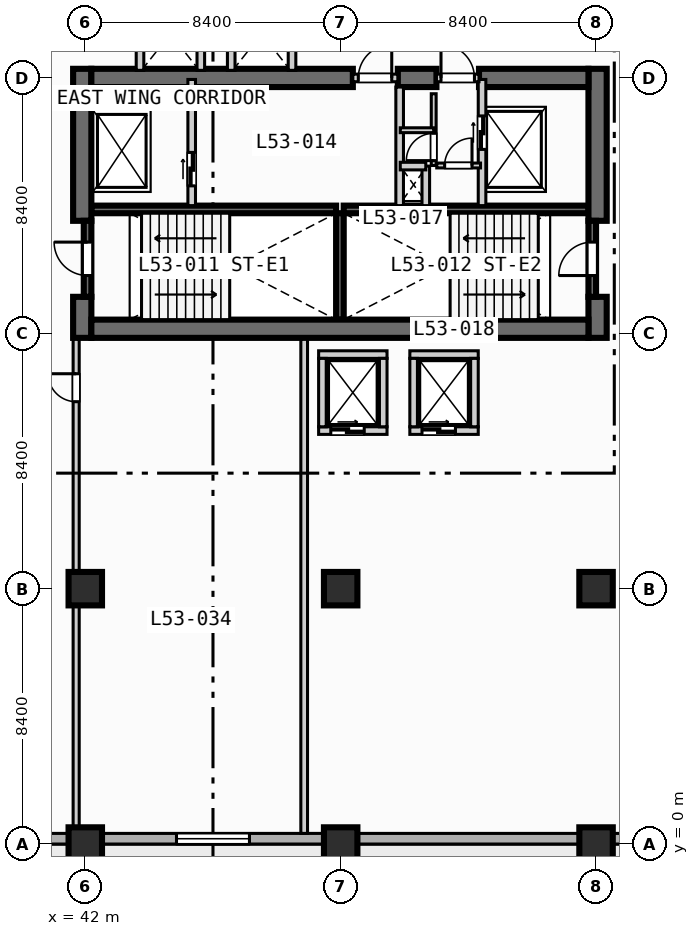
"""IFC4 building model, lengths in metres.
Left out: names, types, materials, properties, quantities, classifications, styles, units other than length and angle.
Written with IfcOpenShell. Run it as: python <this file> out.ifc"""

import sys

from ifc_helpers import new_model, si_unit, direction, frame, frame_2d, origin, origin_2d, place, context, subcontext, project, spatial, rectangle, extrude, element, fill, save


model = new_model("IFC4")
c1 = context("Model", 3, precision=1e-05, world=origin(), true_north=direction((0.0, 1.0)))
c2 = subcontext(c1, "Body", "Model", "MODEL_VIEW")
j1 = project(units=[si_unit("LENGTHUNIT", "METRE"), si_unit("PLANEANGLEUNIT", "RADIAN")], contexts=[c1])
p1 = place(None, origin())
s1 = spatial("IfcSite", under=j1, at=p1, CompositionType="ELEMENT")
p2 = place(p1, origin())
s2 = spatial("IfcBuilding", under=s1, at=p2, CompositionType="ELEMENT")
p3 = place(p2, frame((0.0, 0.0, 216.1)))
s3 = spatial("IfcBuildingStorey", under=s2, at=p3, CompositionType="ELEMENT", Elevation=216.1)
for number, where, z_axis, x_axis in (
    (1, (42.2, 20.875, 0.0), (0.0, 0.0, 1.0), (1.0, 0.0, 0.0)),
    (2, (50.5, 20.875, 0.0), (0.0, 0.0, 1.0), (1.0, 0.0, 0.0)),
):
    element("IfcWall", number, at=place(p3, frame(where, z_axis=z_axis, x_axis=x_axis)), inside=s3, PredefinedType="SOLIDWALL", context=c2, shape_type="SweptSolid", body=[
        extrude(rectangle(XDim=8.05, YDim=0.25, at=frame_2d((4.025, 0.0))), origin(), (0.0, 0.0, 1.0), 3.47),
    ])
p4 = place(p3, frame((50.375, 17.25, 0.0), z_axis=(0.0, 0.0, 1.0), x_axis=(0.0, 1.0, 0.0)))
e3 = element("IfcWall", 3, at=p4, inside=s3, PredefinedType="SOLIDWALL", context=c2, shape_type="SweptSolid", body=[
    extrude(rectangle(XDim=3.5, YDim=0.25, at=frame_2d((1.75, 0.0))), origin(), (0.0, 0.0, 1.0), 3.47),
])
p5 = place(p3, frame((41.9, 16.65, 0.0), z_axis=(0.0, 0.0, 1.0), x_axis=(0.0, 1.0, 0.0)))
e4 = element("IfcWall", 4, at=p5, inside=s3, PredefinedType="SHEAR", context=c2, shape_type="SweptSolid", body=[
    extrude(rectangle(XDim=1.35, YDim=0.6, at=frame_2d((0.675, 0.0))), origin(), (0.0, 0.0, 1.0), 3.47),
])
p6 = place(p3, frame((41.9, 20.5, 0.0), z_axis=(0.0, 0.0, 1.0), x_axis=(0.0, 1.0, 0.0)))
e5 = element("IfcWall", 5, at=p6, inside=s3, PredefinedType="SHEAR", context=c2, shape_type="SweptSolid", body=[
    extrude(rectangle(XDim=5.0, YDim=0.6, at=frame_2d((2.5, 0.0))), origin(), (0.0, 0.0, 1.0), 3.47),
])
p7 = place(p3, frame((58.85, 16.65, 0.0), z_axis=(0.0, 0.0, 1.0), x_axis=(0.0, 1.0, 0.0)))
e6 = element("IfcWall", 6, at=p7, inside=s3, PredefinedType="SHEAR", context=c2, shape_type="SweptSolid", body=[
    extrude(rectangle(XDim=1.35, YDim=0.6, at=frame_2d((0.675, 0.0))), origin(), (0.0, 0.0, 1.0), 3.47),
])
p8 = place(p3, frame((58.85, 20.5, 0.0), z_axis=(0.0, 0.0, 1.0), x_axis=(0.0, 1.0, 0.0)))
e7 = element("IfcWall", 7, at=p8, inside=s3, PredefinedType="SHEAR", context=c2, shape_type="SweptSolid", body=[
    extrude(rectangle(XDim=5.0, YDim=0.6, at=frame_2d((2.5, 0.0))), origin(), (0.0, 0.0, 1.0), 3.47),
])
p9 = place(p3, frame((42.2, 16.95, 0.0), z_axis=(0.0, 0.0, 1.0), x_axis=(1.0, 0.0, 0.0)))
e8 = element("IfcWall", 8, at=p9, inside=s3, PredefinedType="SHEAR", context=c2, shape_type="SweptSolid", body=[
    extrude(rectangle(XDim=16.35, YDim=0.6, at=frame_2d((8.175, 0.0))), origin(), (0.0, 0.0, 1.0), 3.47),
])
p10 = place(p3, frame((42.2, 25.2, 0.0), z_axis=(0.0, 0.0, 1.0), x_axis=(1.0, 0.0, 0.0)))
e9 = element("IfcWall", 9, at=p10, inside=s3, PredefinedType="SHEAR", context=c2, shape_type="SweptSolid", body=[
    extrude(rectangle(XDim=8.6, YDim=0.6, at=frame_2d((4.3, 0.0))), origin(), (0.0, 0.0, 1.0), 3.47),
])
p11 = place(p3, frame((52.28, 25.2, 0.0), z_axis=(0.0, 0.0, 1.0), x_axis=(1.0, 0.0, 0.0)))
e10 = element("IfcWall", 10, at=p11, inside=s3, PredefinedType="SHEAR", context=c2, shape_type="SweptSolid", body=[
    extrude(rectangle(XDim=1.27, YDim=0.6, at=frame_2d((0.635, 0.0))), origin(), (0.0, 0.0, 1.0), 3.47),
])
p12 = place(p3, frame((54.95, 25.2, 0.0), z_axis=(0.0, 0.0, 1.0), x_axis=(1.0, 0.0, 0.0)))
e11 = element("IfcWall", 11, at=p12, inside=s3, PredefinedType="SHEAR", context=c2, shape_type="SweptSolid", body=[
    extrude(rectangle(XDim=3.6, YDim=0.6, at=frame_2d((1.8, 0.0))), origin(), (0.0, 0.0, 1.0), 3.47),
])
for number, where, z_axis, x_axis in (
    (12, (42.0, 0.0, 0.0), (0.0, 0.0, 1.0), (1.0, 0.0, 0.0)),
    (13, (42.0, 8.4, 0.0), (0.0, 0.0, 1.0), (1.0, 0.0, 0.0)),
    (14, (50.4, 0.0, 0.0), (0.0, 0.0, 1.0), (1.0, 0.0, 0.0)),
    (15, (50.4, 8.4, 0.0), (0.0, 0.0, 1.0), (1.0, 0.0, 0.0)),
    (16, (58.8, 0.0, 0.0), (0.0, 0.0, 1.0), (1.0, 0.0, 0.0)),
    (17, (58.8, 8.4, 0.0), (0.0, 0.0, 1.0), (1.0, 0.0, 0.0)),
):
    element("IfcColumn", number, at=place(p3, frame(where, z_axis=z_axis, x_axis=x_axis)), inside=s3, PredefinedType="COLUMN", context=c2, shape_type="SweptSolid", body=[
        extrude(rectangle(XDim=1.1, YDim=1.1, at=origin_2d()), origin(), (0.0, 0.0, 1.0), 3.7),
    ])
p13 = place(p3, frame((72.425, 0.175, 0.0), z_axis=(0.0, 0.0, 1.0), x_axis=(-1.0, 0.0, 0.0)))
e18 = element("IfcWall", 18, at=p13, inside=s3, PredefinedType="STANDARD", context=c2, shape_type="SweptSolid", body=[
    extrude(rectangle(XDim=69.25, YDim=0.35, at=frame_2d((34.625, 0.0))), origin(), (0.0, 0.0, 1.0), 3.47),
])
p14 = place(p13, frame((50.725, 0.0, 0.0)))
e19 = element("IfcOpeningElement", 19, at=p14, cuts=e18, PredefinedType="OPENING", context=c2, shape_type="SweptSolid", body=[
    extrude(rectangle(XDim=1.4, YDim=2.2, at=frame_2d((0.7, 1.1))), frame((0.0, 0.185, 0.0), z_axis=(0.0, -1.0, 0.0), x_axis=(1.0, 0.0, 0.0)), (0.0, 0.0, 1.0), 0.37),
])
p15 = place(p13, frame((58.625, 0.0, 0.85)))
e20 = element("IfcOpeningElement", 20, at=p15, cuts=e18, PredefinedType="OPENING", context=c2, shape_type="SweptSolid", body=[
    extrude(rectangle(XDim=2.4, YDim=1.95, at=frame_2d((1.2, 0.975))), frame((0.0, 0.185, 0.0), z_axis=(0.0, -1.0, 0.0), x_axis=(1.0, 0.0, 0.0)), (0.0, 0.0, 1.0), 0.37),
])
p16 = place(p13, frame((33.725, 0.0, 0.85)))
e21 = element("IfcOpeningElement", 21, at=p16, cuts=e18, PredefinedType="OPENING", context=c2, shape_type="SweptSolid", body=[
    extrude(rectangle(XDim=1.8, YDim=1.8, at=frame_2d((0.9, 0.9))), frame((0.0, 0.185, 0.0), z_axis=(0.0, -1.0, 0.0), x_axis=(1.0, 0.0, 0.0)), (0.0, 0.0, 1.0), 0.37),
])
p17 = place(p13, frame((25.025, 0.0, 0.85)))
e22 = element("IfcOpeningElement", 22, at=p17, cuts=e18, PredefinedType="OPENING", context=c2, shape_type="SweptSolid", body=[
    extrude(rectangle(XDim=2.4, YDim=1.95, at=frame_2d((1.2, 0.975))), frame((0.0, 0.185, 0.0), z_axis=(0.0, -1.0, 0.0), x_axis=(1.0, 0.0, 0.0)), (0.0, 0.0, 1.0), 0.37),
])
p18 = place(p13, frame((9.075, 0.0, 0.85)))
e23 = element("IfcOpeningElement", 23, at=p18, cuts=e18, PredefinedType="OPENING", context=c2, shape_type="SweptSolid", body=[
    extrude(rectangle(XDim=1.8, YDim=1.8, at=frame_2d((0.9, 0.9))), frame((0.0, 0.185, 0.0), z_axis=(0.0, -1.0, 0.0), x_axis=(1.0, 0.0, 0.0)), (0.0, 0.0, 1.0), 0.37),
])
p19 = place(p13, frame((2.675, 0.0, 0.85)))
e24 = element("IfcOpeningElement", 24, at=p19, cuts=e18, PredefinedType="OPENING", context=c2, shape_type="SweptSolid", body=[
    extrude(rectangle(XDim=1.8, YDim=1.8, at=frame_2d((0.9, 0.9))), frame((0.0, 0.185, 0.0), z_axis=(0.0, -1.0, 0.0), x_axis=(1.0, 0.0, 0.0)), (0.0, 0.0, 1.0), 0.37),
])
p20 = place(p3, frame((42.075, 18.0, 0.0), z_axis=(0.0, 0.0, 1.0), x_axis=(0.0, 1.0, 0.0)))
e25 = element("IfcWall", 25, at=p20, inside=s3, PredefinedType="SOLIDWALL", context=c2, shape_type="SweptSolid", body=[
    extrude(rectangle(XDim=2.5, YDim=0.25, at=frame_2d((1.25, 0.0))), origin(), (0.0, 0.0, 1.0), 3.47),
])
p21 = place(p20, frame((0.7, 0.0, 0.0)))
e26 = element("IfcOpeningElement", 26, at=p21, cuts=e25, PredefinedType="OPENING", context=c2, shape_type="SweptSolid", body=[
    extrude(rectangle(XDim=1.1, YDim=2.15, at=frame_2d((0.55, 1.075))), frame((0.0, 0.135, 0.0), z_axis=(0.0, -1.0, 0.0), x_axis=(1.0, 0.0, 0.0)), (0.0, 0.0, 1.0), 0.27),
])
p22 = place(p3, frame((58.675, 18.0, 0.0), z_axis=(0.0, 0.0, 1.0), x_axis=(0.0, 1.0, 0.0)))
e27 = element("IfcWall", 27, at=p22, inside=s3, PredefinedType="SOLIDWALL", context=c2, shape_type="SweptSolid", body=[
    extrude(rectangle(XDim=2.5, YDim=0.25, at=frame_2d((1.25, 0.0))), origin(), (0.0, 0.0, 1.0), 3.47),
])
p23 = place(p22, frame((0.7, 0.0, 0.0)))
e28 = element("IfcOpeningElement", 28, at=p23, cuts=e27, PredefinedType="OPENING", context=c2, shape_type="SweptSolid", body=[
    extrude(rectangle(XDim=1.1, YDim=2.15, at=frame_2d((0.55, 1.075))), frame((0.0, 0.135, 0.0), z_axis=(0.0, -1.0, 0.0), x_axis=(1.0, 0.0, 0.0)), (0.0, 0.0, 1.0), 0.27),
])
p24 = place(p3, frame((45.5, 21.0, 0.0), z_axis=(0.0, 0.0, 1.0), x_axis=(0.0, 1.0, 0.0)))
e29 = element("IfcWall", 29, at=p24, inside=s3, PredefinedType="SOLIDWALL", context=c2, shape_type="SweptSolid", body=[
    extrude(rectangle(XDim=4.15, YDim=0.25, at=frame_2d((2.075, 0.0))), origin(), (0.0, 0.0, 1.0), 3.47),
])
p25 = place(p24, frame((0.65, 0.0, 0.0)))
e30 = element("IfcOpeningElement", 30, at=p25, cuts=e29, PredefinedType="OPENING", context=c2, shape_type="SweptSolid", body=[
    extrude(rectangle(XDim=1.1, YDim=2.15, at=frame_2d((0.55, 1.075))), frame((0.0, 0.135, 0.0), z_axis=(0.0, -1.0, 0.0), x_axis=(1.0, 0.0, 0.0)), (0.0, 0.0, 1.0), 0.27),
])
p26 = place(p3, frame((50.8, 25.2, 0.0), z_axis=(0.0, 0.0, 1.0), x_axis=(1.0, 0.0, 0.0)))
e31 = element("IfcWall", 31, at=p26, inside=s3, PredefinedType="SOLIDWALL", context=c2, shape_type="SweptSolid", body=[
    extrude(rectangle(XDim=1.48, YDim=0.25, at=frame_2d((0.74, 0.0))), origin(), (0.0, 0.0, 1.0), 3.47),
])
p27 = place(p26, frame((0.18, 0.0, 0.0)))
e32 = element("IfcOpeningElement", 32, at=p27, cuts=e31, PredefinedType="OPENING", context=c2, shape_type="SweptSolid", body=[
    extrude(rectangle(XDim=1.1, YDim=2.15, at=frame_2d((0.55, 1.075))), frame((0.0, 0.135, 0.0), z_axis=(0.0, -1.0, 0.0), x_axis=(1.0, 0.0, 0.0)), (0.0, 0.0, 1.0), 0.27),
])
p28 = place(p3, frame((52.34, 21.0, 0.0), z_axis=(0.0, 0.0, 1.0), x_axis=(0.0, 1.0, 0.0)))
e33 = element("IfcWall", 33, at=p28, inside=s3, PredefinedType="SOLIDWALL", context=c2, shape_type="SweptSolid", body=[
    extrude(rectangle(XDim=3.9, YDim=0.25, at=frame_2d((1.95, 0.0))), origin(), (0.0, 0.0, 1.0), 3.47),
])
p29 = place(p3, frame((55.05, 21.0, 0.0), z_axis=(0.0, 0.0, 1.0), x_axis=(0.0, 1.0, 0.0)))
e34 = element("IfcWall", 34, at=p29, inside=s3, PredefinedType="SOLIDWALL", context=c2, shape_type="SweptSolid", body=[
    extrude(rectangle(XDim=4.15, YDim=0.25, at=frame_2d((2.075, 0.0))), origin(), (0.0, 0.0, 1.0), 3.47),
])
p30 = place(p29, frame((1.85, 0.0, 0.0)))
e35 = element("IfcOpeningElement", 35, at=p30, cuts=e34, PredefinedType="OPENING", context=c2, shape_type="SweptSolid", body=[
    extrude(rectangle(XDim=1.1, YDim=2.15, at=frame_2d((0.55, 1.075))), frame((0.0, 0.135, 0.0), z_axis=(0.0, -1.0, 0.0), x_axis=(1.0, 0.0, 0.0)), (0.0, 0.0, 1.0), 0.27),
])
p31 = place(p3, frame((53.55, 25.2, 0.0), z_axis=(0.0, 0.0, 1.0), x_axis=(1.0, 0.0, 0.0)))
e36 = element("IfcWall", 36, at=p31, inside=s3, PredefinedType="SOLIDWALL", context=c2, shape_type="SweptSolid", body=[
    extrude(rectangle(XDim=1.4, YDim=0.25, at=frame_2d((0.7, 0.0))), origin(), (0.0, 0.0, 1.0), 3.47),
])
p32 = place(p31, frame((0.15, 0.0, 0.0)))
e37 = element("IfcOpeningElement", 37, at=p32, cuts=e36, PredefinedType="OPENING", context=c2, shape_type="SweptSolid", body=[
    extrude(rectangle(XDim=1.1, YDim=2.15, at=frame_2d((0.55, 1.075))), frame((0.0, 0.135, 0.0), z_axis=(0.0, -1.0, 0.0), x_axis=(1.0, 0.0, 0.0)), (0.0, 0.0, 1.0), 0.27),
])
p33 = place(p3, frame((53.2, 21.0, 0.0), z_axis=(0.0, 0.0, 1.0), x_axis=(0.0, 1.0, 0.0)))
e38 = element("IfcWall", 38, at=p33, inside=s3, PredefinedType="SOLIDWALL", context=c2, shape_type="SweptSolid", body=[
    extrude(rectangle(XDim=1.3, YDim=0.25, at=frame_2d((0.65, 0.0))), origin(), (0.0, 0.0, 1.0), 3.47),
])
p34 = place(p3, frame((52.36, 22.3, 0.0), z_axis=(0.0, 0.0, 1.0), x_axis=(1.0, 0.0, 0.0)))
e39 = element("IfcWall", 39, at=p34, inside=s3, PredefinedType="SOLIDWALL", context=c2, shape_type="SweptSolid", body=[
    extrude(rectangle(XDim=0.84, YDim=0.25, at=frame_2d((0.42, 0.0))), origin(), (0.0, 0.0, 1.0), 3.47),
])
p35 = place(p3, frame((53.56, 22.32, 0.0), z_axis=(0.0, 0.0, 1.0), x_axis=(1.0, 0.0, 0.0)))
e40 = element("IfcWall", 40, at=p35, inside=s3, PredefinedType="PARTITIONING", context=c2, shape_type="SweptSolid", body=[
    extrude(rectangle(XDim=1.44, YDim=0.16, at=frame_2d((0.72, 0.0))), origin(), (0.0, 0.0, 1.0), 3.47),
])
p36 = place(p35, frame((0.26, 0.0, 0.0)))
e41 = element("IfcOpeningElement", 41, at=p36, cuts=e40, PredefinedType="OPENING", context=c2, shape_type="SweptSolid", body=[
    extrude(rectangle(XDim=0.9, YDim=2.1, at=frame_2d((0.45, 1.05))), frame((0.0, 0.09, 0.0), z_axis=(0.0, -1.0, 0.0), x_axis=(1.0, 0.0, 0.0)), (0.0, 0.0, 1.0), 0.18),
])
p37 = place(p3, frame((53.46, 22.32, 0.0), z_axis=(0.0, 0.0, 1.0), x_axis=(0.0, 1.0, 0.0)))
e42 = element("IfcWall", 42, at=p37, inside=s3, PredefinedType="PARTITIONING", context=c2, shape_type="SweptSolid", body=[
    extrude(rectangle(XDim=2.36, YDim=0.16, at=frame_2d((1.18, 0.0))), origin(), (0.0, 0.0, 1.0), 3.47),
])
p38 = place(p37, frame((0.16, 0.0, 0.0)))
e43 = element("IfcOpeningElement", 43, at=p38, cuts=e42, PredefinedType="OPENING", context=c2, shape_type="SweptSolid", body=[
    extrude(rectangle(XDim=0.9, YDim=2.1, at=frame_2d((0.45, 1.05))), frame((0.0, 0.09, 0.0), z_axis=(0.0, -1.0, 0.0), x_axis=(1.0, 0.0, 0.0)), (0.0, 0.0, 1.0), 0.18),
])
p39 = place(p3, frame((52.36, 23.48, 0.0), z_axis=(0.0, 0.0, 1.0), x_axis=(1.0, 0.0, 0.0)))
e44 = element("IfcWall", 44, at=p39, inside=s3, PredefinedType="PARTITIONING", context=c2, shape_type="SweptSolid", body=[
    extrude(rectangle(XDim=1.1, YDim=0.16, at=frame_2d((0.55, 0.0))), origin(), (0.0, 0.0, 1.0), 3.47),
])
p40 = place(p3, frame((49.675, 13.6, 0.0), z_axis=(0.0, 0.0, 1.0), x_axis=(1.0, 0.0, 0.0)))
e45 = element("IfcWall", 45, at=p40, inside=s3, PredefinedType="SOLIDWALL", context=c2, shape_type="SweptSolid", body=[
    extrude(rectangle(XDim=2.25, YDim=0.25, at=frame_2d((1.125, 0.0))), origin(), (0.0, 0.0, 1.0), 3.47),
])
p41 = place(p40, frame((0.4, 0.0, 0.0)))
e46 = element("IfcOpeningElement", 46, at=p41, cuts=e45, PredefinedType="OPENING", context=c2, shape_type="SweptSolid", body=[
    extrude(rectangle(XDim=1.1, YDim=2.15, at=frame_2d((0.55, 1.075))), frame((0.0, 0.135, 0.0), z_axis=(0.0, -1.0, 0.0), x_axis=(1.0, 0.0, 0.0)), (0.0, 0.0, 1.0), 0.27),
])
for number, where, z_axis, x_axis in (
    (47, (49.675, 16.1, 0.0), (0.0, 0.0, 1.0), (1.0, 0.0, 0.0)),
    (48, (49.8, 13.725, 0.0), (0.0, 0.0, 1.0), (0.0, 1.0, 0.0)),
    (49, (51.8, 13.725, 0.0), (0.0, 0.0, 1.0), (0.0, 1.0, 0.0)),
):
    element("IfcWall", number, at=place(p3, frame(where, z_axis=z_axis, x_axis=x_axis)), inside=s3, PredefinedType="SOLIDWALL", context=c2, shape_type="SweptSolid", body=[
        extrude(rectangle(XDim=2.25, YDim=0.25, at=frame_2d((1.125, 0.0))), origin(), (0.0, 0.0, 1.0), 3.47),
    ])
p42 = place(p3, frame((52.675, 13.6, 0.0), z_axis=(0.0, 0.0, 1.0), x_axis=(1.0, 0.0, 0.0)))
e50 = element("IfcWall", 50, at=p42, inside=s3, PredefinedType="SOLIDWALL", context=c2, shape_type="SweptSolid", body=[
    extrude(rectangle(XDim=2.25, YDim=0.25, at=frame_2d((1.125, 0.0))), origin(), (0.0, 0.0, 1.0), 3.47),
])
p43 = place(p42, frame((0.4, 0.0, 0.0)))
e51 = element("IfcOpeningElement", 51, at=p43, cuts=e50, PredefinedType="OPENING", context=c2, shape_type="SweptSolid", body=[
    extrude(rectangle(XDim=1.1, YDim=2.15, at=frame_2d((0.55, 1.075))), frame((0.0, 0.135, 0.0), z_axis=(0.0, -1.0, 0.0), x_axis=(1.0, 0.0, 0.0)), (0.0, 0.0, 1.0), 0.27),
])
for number, where, z_axis, x_axis in (
    (52, (52.675, 16.1, 0.0), (0.0, 0.0, 1.0), (1.0, 0.0, 0.0)),
    (53, (52.8, 13.725, 0.0), (0.0, 0.0, 1.0), (0.0, 1.0, 0.0)),
    (54, (54.8, 13.725, 0.0), (0.0, 0.0, 1.0), (0.0, 1.0, 0.0)),
):
    element("IfcWall", number, at=place(p3, frame(where, z_axis=z_axis, x_axis=x_axis)), inside=s3, PredefinedType="SOLIDWALL", context=c2, shape_type="SweptSolid", body=[
        extrude(rectangle(XDim=2.25, YDim=0.25, at=frame_2d((1.125, 0.0))), origin(), (0.0, 0.0, 1.0), 3.47),
    ])
for number, where, z_axis, x_axis in (
    (55, (43.8, 25.45, 0.0), (0.0, 0.0, 1.0), (0.0, 1.0, 0.0)),
    (56, (45.8, 25.45, 0.0), (0.0, 0.0, 1.0), (0.0, 1.0, 0.0)),
    (57, (46.8, 25.45, 0.0), (0.0, 0.0, 1.0), (0.0, 1.0, 0.0)),
    (58, (48.8, 25.45, 0.0), (0.0, 0.0, 1.0), (0.0, 1.0, 0.0)),
):
    element("IfcWall", number, at=place(p3, frame(where, z_axis=z_axis, x_axis=x_axis)), inside=s3, PredefinedType="SOLIDWALL", context=c2, shape_type="SweptSolid", body=[
        extrude(rectangle(XDim=2.325, YDim=0.25, at=frame_2d((1.163, 0.0))), origin(), (0.0, 0.0, 1.0), 3.47),
    ])
p44 = place(p3, frame((41.7, 0.35, 0.0), z_axis=(0.0, 0.0, 1.0), x_axis=(0.0, 1.0, 0.0)))
e59 = element("IfcWall", 59, at=p44, inside=s3, PredefinedType="PARTITIONING", context=c2, shape_type="SweptSolid", body=[
    extrude(rectangle(XDim=16.25, YDim=0.2, at=frame_2d((8.125, 0.0))), origin(), (0.0, 0.0, 1.0), 2.82),
])
p45 = place(p44, frame((14.2, 0.0, 0.0)))
e60 = element("IfcOpeningElement", 60, at=p45, cuts=e59, PredefinedType="OPENING", context=c2, shape_type="SweptSolid", body=[
    extrude(rectangle(XDim=0.92, YDim=2.1, at=frame_2d((0.46, 1.05))), frame((0.0, 0.11, 0.0), z_axis=(0.0, -1.0, 0.0), x_axis=(1.0, 0.0, 0.0)), (0.0, 0.0, 1.0), 0.22),
])
p46 = place(p3, frame((49.2, 0.35, 0.0), z_axis=(0.0, 0.0, 1.0), x_axis=(0.0, 1.0, 0.0)))
e61 = element("IfcWall", 61, at=p46, inside=s3, PredefinedType="PARTITIONING", context=c2, shape_type="SweptSolid", body=[
    extrude(rectangle(XDim=16.25, YDim=0.22, at=frame_2d((8.125, 0.0))), origin(), (0.0, 0.0, 1.0), 3.47),
])
p47 = place(p17, origin())
e62 = element("IfcWindow", 62, at=p47, inside=s3, PartitioningType="SINGLE_PANEL", PredefinedType="WINDOW", context=c2, shape_type="SweptSolid", body=[
    extrude(rectangle(XDim=2.4, YDim=1.95, at=frame_2d((1.2, 0.975))), frame((0.0, 0.03, 0.0), z_axis=(0.0, -1.0, 0.0), x_axis=(1.0, 0.0, 0.0)), (0.0, 0.0, 1.0), 0.06),
])
fill(e22, e62)
p48 = place(p21, origin())
e63 = element("IfcDoor", 63, at=p48, inside=s3, OperationType="SINGLE_SWING_RIGHT", PredefinedType="DOOR", context=c2, shape_type="SweptSolid", body=[
    extrude(rectangle(XDim=1.1, YDim=2.15, at=frame_2d((0.55, 1.075))), frame((0.0, 0.025, 0.0), z_axis=(0.0, -1.0, 0.0), x_axis=(1.0, 0.0, 0.0)), (0.0, 0.0, 1.0), 0.05),
])
fill(e26, e63)
p49 = place(p23, origin())
e64 = element("IfcDoor", 64, at=p49, inside=s3, OperationType="SINGLE_SWING_LEFT", PredefinedType="DOOR", context=c2, shape_type="SweptSolid", body=[
    extrude(rectangle(XDim=1.1, YDim=2.15, at=frame_2d((0.55, 1.075))), frame((0.0, 0.025, 0.0), z_axis=(0.0, -1.0, 0.0), x_axis=(1.0, 0.0, 0.0)), (0.0, 0.0, 1.0), 0.05),
])
fill(e28, e64)
p50 = place(p25, origin())
e65 = element("IfcDoor", 65, at=p50, inside=s3, OperationType="SLIDING_TO_LEFT", PredefinedType="DOOR", context=c2, shape_type="SweptSolid", body=[
    extrude(rectangle(XDim=1.1, YDim=2.15, at=frame_2d((0.55, 1.075))), frame((0.0, 0.025, 0.0), z_axis=(0.0, -1.0, 0.0), x_axis=(1.0, 0.0, 0.0)), (0.0, 0.0, 1.0), 0.05),
])
fill(e30, e65)
p51 = place(p27, origin())
e66 = element("IfcDoor", 66, at=p51, inside=s3, OperationType="SINGLE_SWING_RIGHT", PredefinedType="DOOR", context=c2, shape_type="SweptSolid", body=[
    extrude(rectangle(XDim=1.1, YDim=2.15, at=frame_2d((0.55, 1.075))), frame((0.0, 0.025, 0.0), z_axis=(0.0, -1.0, 0.0), x_axis=(1.0, 0.0, 0.0)), (0.0, 0.0, 1.0), 0.05),
])
fill(e32, e66)
p52 = place(p30, origin())
e67 = element("IfcDoor", 67, at=p52, inside=s3, OperationType="SLIDING_TO_LEFT", PredefinedType="DOOR", context=c2, shape_type="SweptSolid", body=[
    extrude(rectangle(XDim=1.1, YDim=2.15, at=frame_2d((0.55, 1.075))), frame((0.0, 0.025, 0.0), z_axis=(0.0, -1.0, 0.0), x_axis=(1.0, 0.0, 0.0)), (0.0, 0.0, 1.0), 0.05),
])
fill(e35, e67)
p53 = place(p32, origin())
e68 = element("IfcDoor", 68, at=p53, inside=s3, OperationType="SINGLE_SWING_LEFT", PredefinedType="DOOR", context=c2, shape_type="SweptSolid", body=[
    extrude(rectangle(XDim=1.1, YDim=2.15, at=frame_2d((0.55, 1.075))), frame((0.0, 0.025, 0.0), z_axis=(0.0, -1.0, 0.0), x_axis=(1.0, 0.0, 0.0)), (0.0, 0.0, 1.0), 0.05),
])
fill(e37, e68)
p54 = place(p36, origin())
e69 = element("IfcDoor", 69, at=p54, inside=s3, OperationType="SINGLE_SWING_RIGHT", PredefinedType="DOOR", context=c2, shape_type="SweptSolid", body=[
    extrude(rectangle(XDim=0.9, YDim=2.1, at=frame_2d((0.45, 1.05))), frame((0.0, 0.025, 0.0), z_axis=(0.0, -1.0, 0.0), x_axis=(1.0, 0.0, 0.0)), (0.0, 0.0, 1.0), 0.05),
])
fill(e41, e69)
p55 = place(p38, origin())
e70 = element("IfcDoor", 70, at=p55, inside=s3, OperationType="SINGLE_SWING_LEFT", PredefinedType="DOOR", context=c2, shape_type="SweptSolid", body=[
    extrude(rectangle(XDim=0.9, YDim=2.1, at=frame_2d((0.45, 1.05))), frame((0.0, 0.025, 0.0), z_axis=(0.0, -1.0, 0.0), x_axis=(1.0, 0.0, 0.0)), (0.0, 0.0, 1.0), 0.05),
])
fill(e43, e70)
p56 = place(p41, origin())
e71 = element("IfcDoor", 71, at=p56, inside=s3, OperationType="SLIDING_TO_LEFT", PredefinedType="DOOR", context=c2, shape_type="SweptSolid", body=[
    extrude(rectangle(XDim=1.1, YDim=2.15, at=frame_2d((0.55, 1.075))), frame((0.0, 0.025, 0.0), z_axis=(0.0, -1.0, 0.0), x_axis=(1.0, 0.0, 0.0)), (0.0, 0.0, 1.0), 0.05),
])
fill(e46, e71)
p57 = place(p43, origin())
e72 = element("IfcDoor", 72, at=p57, inside=s3, OperationType="SLIDING_TO_LEFT", PredefinedType="DOOR", context=c2, shape_type="SweptSolid", body=[
    extrude(rectangle(XDim=1.1, YDim=2.15, at=frame_2d((0.55, 1.075))), frame((0.0, 0.025, 0.0), z_axis=(0.0, -1.0, 0.0), x_axis=(1.0, 0.0, 0.0)), (0.0, 0.0, 1.0), 0.05),
])
fill(e51, e72)
p58 = place(p45, origin())
e73 = element("IfcDoor", 73, at=p58, inside=s3, OperationType="SINGLE_SWING_RIGHT", PredefinedType="DOOR", context=c2, shape_type="SweptSolid", body=[
    extrude(rectangle(XDim=0.92, YDim=2.1, at=frame_2d((0.46, 1.05))), frame((0.0, 0.025, 0.0), z_axis=(0.0, -1.0, 0.0), x_axis=(1.0, 0.0, 0.0)), (0.0, 0.0, 1.0), 0.05),
])
fill(e60, e73)
save(model, sys.argv[1])
